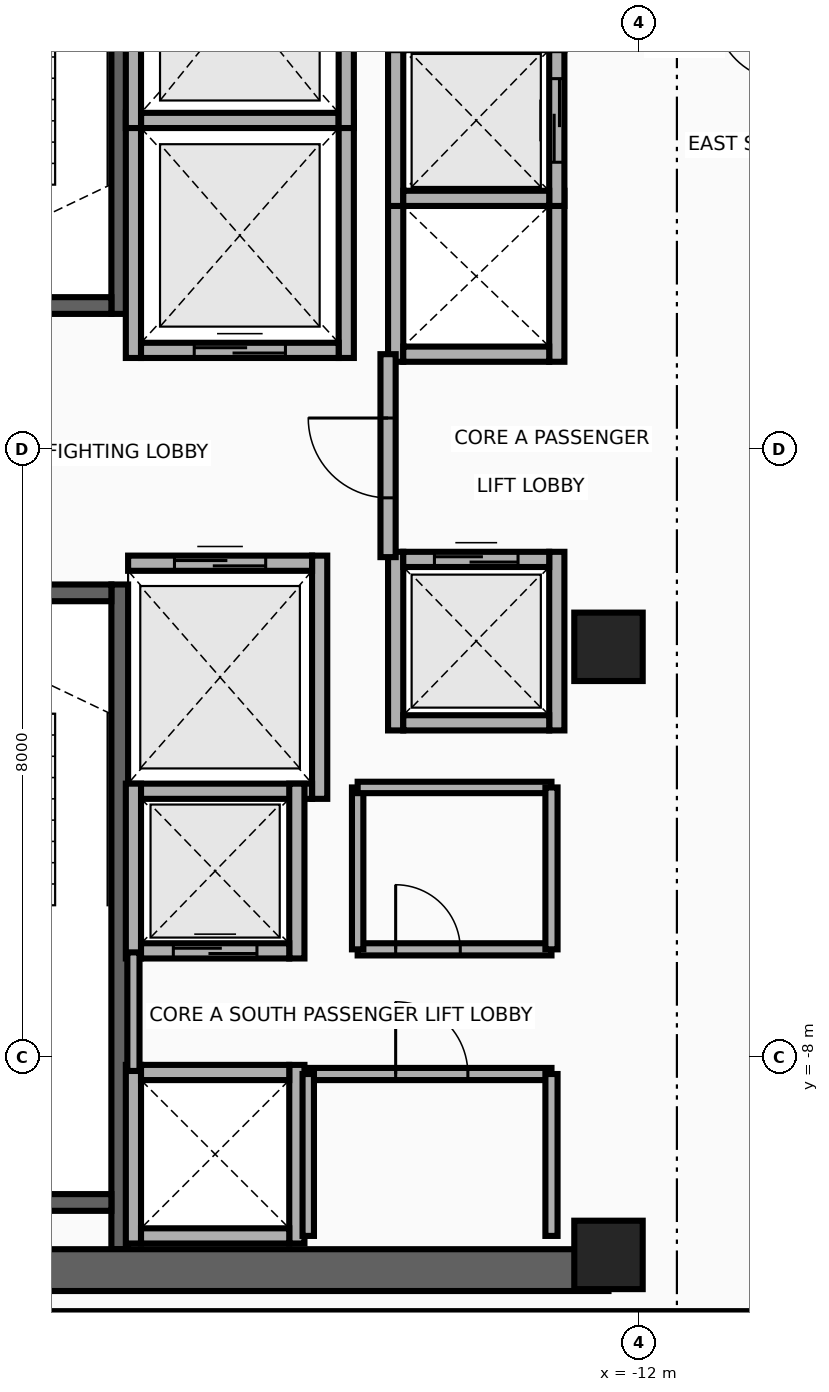
"""IFC4 building model, lengths in metres.
Left out: names, types, materials, properties, quantities, classifications, styles, units other than length and angle.
Written with IfcOpenShell. Run it as: python <this file> out.ifc"""

import sys

from ifc_helpers import new_model, si_unit, direction, frame, frame_2d, origin, origin_2d, place, context, subcontext, project, spatial, rectangle, extrude, source, transform, mapped, element, fill, save


model = new_model("IFC4")
c1 = context("Model", 3, precision=1e-05, world=origin(), true_north=direction((0.0, 1.0)))
c2 = subcontext(c1, "Body", "Model", "MODEL_VIEW")
j1 = project(units=[si_unit("LENGTHUNIT", "METRE"), si_unit("PLANEANGLEUNIT", "RADIAN")], contexts=[c1])
p1 = place(None, origin())
s1 = spatial("IfcSite", under=j1, at=p1, CompositionType="ELEMENT")
p2 = place(p1, origin())
s2 = spatial("IfcBuilding", under=s1, at=p2, CompositionType="ELEMENT")
p3 = place(p2, frame((0.0, 0.0, 205.5)))
s3 = spatial("IfcBuildingStorey", under=s2, at=p3, CompositionType="ELEMENT", Elevation=205.5)
p4 = place(p3, frame((-18.83, 1.78, 0.0), z_axis=(0.0, 0.0, 1.0), x_axis=(0.0, 1.0, 0.0)))
e1 = element("IfcWall", 1, at=p4, inside=s3, PredefinedType="SHEAR", context=c2, shape_type="SweptSolid", body=[
    extrude(rectangle(XDim=8.745, YDim=0.22, at=frame_2d((4.373, 0.0))), origin(), (0.0, 0.0, 1.0), 3.26),
])
p5 = place(p3, frame((-22.05, 1.89, 0.0), z_axis=(0.0, 0.0, 1.0), x_axis=(1.0, 0.0, 0.0)))
e2 = element("IfcWall", 2, at=p5, inside=s3, PredefinedType="SHEAR", context=c2, shape_type="SweptSolid", body=[
    extrude(rectangle(XDim=3.11, YDim=0.22, at=frame_2d((1.555, 0.0))), origin(), (0.0, 0.0, 1.0), 3.26),
])
p6 = place(p5, frame((1.0, 0.0, 0.0)))
e3 = element("IfcOpeningElement", 3, at=p6, cuts=e2, PredefinedType="OPENING", context=c2, shape_type="SweptSolid", body=[
    extrude(rectangle(XDim=1.1, YDim=2.15, at=frame_2d((0.55, 1.075))), frame((0.0, 0.125, 0.0), z_axis=(0.0, -1.0, 0.0), x_axis=(1.0, 0.0, 0.0)), (0.0, 0.0, 1.0), 0.25),
])
p7 = place(p3, frame((-18.83, -10.525, 0.0), z_axis=(0.0, 0.0, 1.0), x_axis=(0.0, 1.0, 0.0)))
e4 = element("IfcWall", 4, at=p7, inside=s3, PredefinedType="SHEAR", context=c2, shape_type="SweptSolid", body=[
    extrude(rectangle(XDim=8.745, YDim=0.22, at=frame_2d((4.373, 0.0))), origin(), (0.0, 0.0, 1.0), 3.26),
])
p8 = place(p3, frame((-22.05, -9.91, 0.0), z_axis=(0.0, 0.0, 1.0), x_axis=(1.0, 0.0, 0.0)))
e5 = element("IfcWall", 5, at=p8, inside=s3, PredefinedType="SHEAR", context=c2, shape_type="SweptSolid", body=[
    extrude(rectangle(XDim=3.11, YDim=0.22, at=frame_2d((1.555, 0.0))), origin(), (0.0, 0.0, 1.0), 3.26),
])
p9 = place(p3, frame((-22.05, -1.89, 0.0), z_axis=(0.0, 0.0, 1.0), x_axis=(1.0, 0.0, 0.0)))
e6 = element("IfcWall", 6, at=p9, inside=s3, PredefinedType="SHEAR", context=c2, shape_type="SweptSolid", body=[
    extrude(rectangle(XDim=3.11, YDim=0.22, at=frame_2d((1.555, 0.0))), origin(), (0.0, 0.0, 1.0), 3.26),
])
p10 = place(p9, frame((1.0, 0.0, 0.0)))
e7 = element("IfcOpeningElement", 7, at=p10, cuts=e6, PredefinedType="OPENING", context=c2, shape_type="SweptSolid", body=[
    extrude(rectangle(XDim=1.1, YDim=2.15, at=frame_2d((0.55, 1.075))), frame((0.0, 0.125, 0.0), z_axis=(0.0, -1.0, 0.0), x_axis=(1.0, 0.0, 0.0)), (0.0, 0.0, 1.0), 0.25),
])
p11 = place(p3, frame((-22.65, -10.8, 0.0), z_axis=(0.0, 0.0, 1.0), x_axis=(1.0, 0.0, 0.0)))
e8 = element("IfcWall", 8, at=p11, inside=s3, PredefinedType="SHEAR", context=c2, shape_type="SweptSolid", body=[
    extrude(rectangle(XDim=10.25, YDim=0.55, at=frame_2d((5.125, 0.0))), origin(), (0.0, 0.0, 1.0), 3.26),
])
m1 = source(origin(), c2, "Body", "SweptSolid", [
    extrude(rectangle(XDim=0.9, YDim=0.9, at=origin_2d()), origin(), (0.0, 0.0, 1.0), 3.5),
])
for number, where, z_axis, x_axis in (
    (9, (-12.4, -10.6, 0.0), (0.0, 0.0, 1.0), (1.0, 0.0, 0.0)),
    (10, (-12.4, -2.6, 0.0), (0.0, 0.0, 1.0), (1.0, 0.0, 0.0)),
):
    element("IfcColumn", number, at=place(p3, frame(where, z_axis=z_axis, x_axis=x_axis)), inside=s3, PredefinedType="COLUMN", context=c2, shape_type="MappedRepresentation", body=[
        mapped(m1, transform((0.0, 0.0, 0.0), x_axis=(1.0, 0.0, 0.0), y_axis=(0.0, 1.0, 0.0), z_axis=(0.0, 0.0, 1.0), scale=1.0)),
    ])
for number, where, z_axis, x_axis in (
    (11, (-18.65, 1.2, 0.0), (0.0, 0.0, 1.0), (0.0, 1.0, 0.0)),
    (12, (-15.85, 1.2, 0.0), (0.0, 0.0, 1.0), (0.0, 1.0, 0.0)),
):
    element("IfcWall", number, at=place(p3, frame(where, z_axis=z_axis, x_axis=x_axis)), inside=s3, PredefinedType="MOVABLE", context=c2, shape_type="SweptSolid", body=[
        extrude(rectangle(XDim=3.225, YDim=0.2, at=frame_2d((1.613, 0.0))), origin(), (0.0, 0.0, 1.0), 3.26),
    ])
p12 = place(p3, frame((-18.55, 1.3, 0.0), z_axis=(0.0, 0.0, 1.0), x_axis=(1.0, 0.0, 0.0)))
e13 = element("IfcWall", 13, at=p12, inside=s3, PredefinedType="MOVABLE", context=c2, shape_type="SweptSolid", body=[
    extrude(rectangle(XDim=2.6, YDim=0.2, at=frame_2d((1.3, 0.0))), origin(), (0.0, 0.0, 1.0), 3.26),
])
p13 = place(p12, frame((0.7, 0.0, 0.0)))
e14 = element("IfcOpeningElement", 14, at=p13, cuts=e13, PredefinedType="OPENING", context=c2, shape_type="SweptSolid", body=[
    extrude(rectangle(XDim=1.2, YDim=2.1, at=frame_2d((0.6, 1.05))), frame((0.0, 0.115, 0.0), z_axis=(0.0, -1.0, 0.0), x_axis=(1.0, 0.0, 0.0)), (0.0, 0.0, 1.0), 0.23),
])
p14 = place(p3, frame((-18.55, 4.325, 0.0), z_axis=(0.0, 0.0, 1.0), x_axis=(1.0, 0.0, 0.0)))
e15 = element("IfcWall", 15, at=p14, inside=s3, PredefinedType="MOVABLE", context=c2, shape_type="SweptSolid", body=[
    extrude(rectangle(XDim=2.6, YDim=0.2, at=frame_2d((1.3, 0.0))), origin(), (0.0, 0.0, 1.0), 3.26),
])
p15 = place(p3, frame((-16.2, -4.6, 0.0), z_axis=(0.0, 0.0, 1.0), x_axis=(0.0, 1.0, 0.0)))
e16 = element("IfcWall", 16, at=p15, inside=s3, PredefinedType="MOVABLE", context=c2, shape_type="SweptSolid", body=[
    extrude(rectangle(XDim=3.2, YDim=0.2, at=frame_2d((1.6, 0.0))), origin(), (0.0, 0.0, 1.0), 3.26),
])
p16 = place(p3, frame((-18.72, -4.5, 0.0), z_axis=(0.0, 0.0, 1.0), x_axis=(1.0, 0.0, 0.0)))
e17 = element("IfcWall", 17, at=p16, inside=s3, PredefinedType="MOVABLE", context=c2, shape_type="SweptSolid", body=[
    extrude(rectangle(XDim=2.42, YDim=0.2, at=frame_2d((1.21, 0.0))), origin(), (0.0, 0.0, 1.0), 3.26),
])
p17 = place(p3, frame((-18.72, -1.5, 0.0), z_axis=(0.0, 0.0, 1.0), x_axis=(1.0, 0.0, 0.0)))
e18 = element("IfcWall", 18, at=p17, inside=s3, PredefinedType="MOVABLE", context=c2, shape_type="SweptSolid", body=[
    extrude(rectangle(XDim=2.42, YDim=0.2, at=frame_2d((1.21, 0.0))), origin(), (0.0, 0.0, 1.0), 3.26),
])
p18 = place(p17, frame((0.61, 0.0, 0.0)))
e19 = element("IfcOpeningElement", 19, at=p18, cuts=e18, PredefinedType="OPENING", context=c2, shape_type="SweptSolid", body=[
    extrude(rectangle(XDim=1.2, YDim=2.1, at=frame_2d((0.6, 1.05))), frame((0.0, 0.115, 0.0), z_axis=(0.0, -1.0, 0.0), x_axis=(1.0, 0.0, 0.0)), (0.0, 0.0, 1.0), 0.23),
])
for number, where, z_axis, x_axis in (
    (20, (-18.65, 4.225, 0.0), (0.0, 0.0, 1.0), (0.0, 1.0, 0.0)),
    (21, (-15.85, 4.225, 0.0), (0.0, 0.0, 1.0), (0.0, 1.0, 0.0)),
):
    element("IfcWall", number, at=place(p3, frame(where, z_axis=z_axis, x_axis=x_axis)), inside=s3, PredefinedType="MOVABLE", context=c2, shape_type="SweptSolid", body=[
        extrude(rectangle(XDim=3.325, YDim=0.2, at=frame_2d((1.663, 0.0))), origin(), (0.0, 0.0, 1.0), 3.26),
    ])
for number, where, z_axis, x_axis in (
    (22, (-18.65, -10.45, 0.0), (0.0, 0.0, 1.0), (0.0, 1.0, 0.0)),
    (23, (-16.5, -10.45, 0.0), (0.0, 0.0, 1.0), (0.0, 1.0, 0.0)),
):
    element("IfcWall", number, at=place(p3, frame(where, z_axis=z_axis, x_axis=x_axis)), inside=s3, PredefinedType="MOVABLE", context=c2, shape_type="SweptSolid", body=[
        extrude(rectangle(XDim=2.35, YDim=0.2, at=frame_2d((1.175, 0.0))), origin(), (0.0, 0.0, 1.0), 2.544),
    ])
p19 = place(p3, frame((-18.55, -10.35, 0.0), z_axis=(0.0, 0.0, 1.0), x_axis=(1.0, 0.0, 0.0)))
e24 = element("IfcWall", 24, at=p19, inside=s3, PredefinedType="MOVABLE", context=c2, shape_type="SweptSolid", body=[
    extrude(rectangle(XDim=1.95, YDim=0.2, at=frame_2d((0.975, 0.0))), origin(), (0.0, 0.0, 1.0), 2.544),
])
p20 = place(p3, frame((-18.55, -8.2, 0.0), z_axis=(0.0, 0.0, 1.0), x_axis=(1.0, 0.0, 0.0)))
e25 = element("IfcWall", 25, at=p20, inside=s3, PredefinedType="MOVABLE", context=c2, shape_type="SweptSolid", body=[
    extrude(rectangle(XDim=1.95, YDim=0.2, at=frame_2d((0.975, 0.0))), origin(), (0.0, 0.0, 1.0), 3.26),
])
for number, where, z_axis, x_axis in (
    (26, (-15.2, 1.15, 0.0), (0.0, 0.0, 1.0), (0.0, 1.0, 0.0)),
    (27, (-13.08, 1.15, 0.0), (0.0, 0.0, 1.0), (0.0, 1.0, 0.0)),
):
    element("IfcWall", number, at=place(p3, frame(where, z_axis=z_axis, x_axis=x_axis)), inside=s3, PredefinedType="MOVABLE", context=c2, shape_type="SweptSolid", body=[
        extrude(rectangle(XDim=2.25, YDim=0.2, at=frame_2d((1.125, 0.0))), origin(), (0.0, 0.0, 1.0), 3.26),
    ])
p21 = place(p3, frame((-15.1, 1.25, 0.0), z_axis=(0.0, 0.0, 1.0), x_axis=(1.0, 0.0, 0.0)))
e28 = element("IfcWall", 28, at=p21, inside=s3, PredefinedType="MOVABLE", context=c2, shape_type="SweptSolid", body=[
    extrude(rectangle(XDim=1.92, YDim=0.2, at=frame_2d((0.96, 0.0))), origin(), (0.0, 0.0, 1.0), 3.26),
])
p22 = place(p3, frame((-15.2, 3.2, 0.0), z_axis=(0.0, 0.0, 1.0), x_axis=(0.0, 1.0, 0.0)))
e29 = element("IfcWall", 29, at=p22, inside=s3, PredefinedType="MOVABLE", context=c2, shape_type="SweptSolid", body=[
    extrude(rectangle(XDim=2.25, YDim=0.2, at=frame_2d((1.125, 0.0))), origin(), (0.0, 0.0, 1.0), 3.26),
])
p23 = place(p3, frame((-13.08, 3.2, 0.0), z_axis=(0.0, 0.0, 1.0), x_axis=(0.0, 1.0, 0.0)))
e30 = element("IfcWall", 30, at=p23, inside=s3, PredefinedType="MOVABLE", context=c2, shape_type="SweptSolid", body=[
    extrude(rectangle(XDim=2.25, YDim=0.2, at=frame_2d((1.125, 0.0))), origin(), (0.0, 0.0, 1.0), 3.26),
])
p24 = place(p23, frame((0.575, 0.0, 0.0)))
e31 = element("IfcOpeningElement", 31, at=p24, cuts=e30, PredefinedType="OPENING", context=c2, shape_type="SweptSolid", body=[
    extrude(rectangle(XDim=1.1, YDim=2.1, at=frame_2d((0.55, 1.05))), frame((0.0, 0.115, 0.0), z_axis=(0.0, -1.0, 0.0), x_axis=(1.0, 0.0, 0.0)), (0.0, 0.0, 1.0), 0.23),
])
p25 = place(p3, frame((-15.1, 3.3, 0.0), z_axis=(0.0, 0.0, 1.0), x_axis=(1.0, 0.0, 0.0)))
e32 = element("IfcWall", 32, at=p25, inside=s3, PredefinedType="MOVABLE", context=c2, shape_type="SweptSolid", body=[
    extrude(rectangle(XDim=1.92, YDim=0.2, at=frame_2d((0.96, 0.0))), origin(), (0.0, 0.0, 1.0), 3.26),
])
for number, where, z_axis, x_axis in (
    (33, (-18.65, -6.7, 0.0), (0.0, 0.0, 1.0), (0.0, 1.0, 0.0)),
    (34, (-16.5, -6.7, 0.0), (0.0, 0.0, 1.0), (0.0, 1.0, 0.0)),
):
    element("IfcWall", number, at=place(p3, frame(where, z_axis=z_axis, x_axis=x_axis)), inside=s3, PredefinedType="MOVABLE", context=c2, shape_type="SweptSolid", body=[
        extrude(rectangle(XDim=2.3, YDim=0.2, at=frame_2d((1.15, 0.0))), origin(), (0.0, 0.0, 1.0), 3.26),
    ])
p26 = place(p3, frame((-18.55, -6.6, 0.0), z_axis=(0.0, 0.0, 1.0), x_axis=(1.0, 0.0, 0.0)))
e35 = element("IfcWall", 35, at=p26, inside=s3, PredefinedType="MOVABLE", context=c2, shape_type="SweptSolid", body=[
    extrude(rectangle(XDim=1.95, YDim=0.2, at=frame_2d((0.975, 0.0))), origin(), (0.0, 0.0, 1.0), 3.26),
])
p27 = place(p26, frame((0.425, 0.0, 0.0)))
e36 = element("IfcOpeningElement", 36, at=p27, cuts=e35, PredefinedType="OPENING", context=c2, shape_type="SweptSolid", body=[
    extrude(rectangle(XDim=1.1, YDim=2.1, at=frame_2d((0.55, 1.05))), frame((0.0, 0.115, 0.0), z_axis=(0.0, -1.0, 0.0), x_axis=(1.0, 0.0, 0.0)), (0.0, 0.0, 1.0), 0.23),
])
for number, where, z_axis, x_axis in (
    (37, (-15.2, -3.7, 0.0), (0.0, 0.0, 1.0), (0.0, 1.0, 0.0)),
    (38, (-13.08, -3.7, 0.0), (0.0, 0.0, 1.0), (0.0, 1.0, 0.0)),
):
    element("IfcWall", number, at=place(p3, frame(where, z_axis=z_axis, x_axis=x_axis)), inside=s3, PredefinedType="MOVABLE", context=c2, shape_type="SweptSolid", body=[
        extrude(rectangle(XDim=2.35, YDim=0.2, at=frame_2d((1.175, 0.0))), origin(), (0.0, 0.0, 1.0), 3.26),
    ])
p28 = place(p3, frame((-15.1, -3.6, 0.0), z_axis=(0.0, 0.0, 1.0), x_axis=(1.0, 0.0, 0.0)))
e39 = element("IfcWall", 39, at=p28, inside=s3, PredefinedType="MOVABLE", context=c2, shape_type="SweptSolid", body=[
    extrude(rectangle(XDim=1.92, YDim=0.2, at=frame_2d((0.96, 0.0))), origin(), (0.0, 0.0, 1.0), 3.26),
])
p29 = place(p3, frame((-15.1, -1.45, 0.0), z_axis=(0.0, 0.0, 1.0), x_axis=(1.0, 0.0, 0.0)))
e40 = element("IfcWall", 40, at=p29, inside=s3, PredefinedType="MOVABLE", context=c2, shape_type="SweptSolid", body=[
    extrude(rectangle(XDim=1.92, YDim=0.2, at=frame_2d((0.96, 0.0))), origin(), (0.0, 0.0, 1.0), 3.26),
])
p30 = place(p29, frame((0.41, 0.0, 0.0)))
e41 = element("IfcOpeningElement", 41, at=p30, cuts=e40, PredefinedType="OPENING", context=c2, shape_type="SweptSolid", body=[
    extrude(rectangle(XDim=1.1, YDim=2.1, at=frame_2d((0.55, 1.05))), frame((0.0, 0.115, 0.0), z_axis=(0.0, -1.0, 0.0), x_axis=(1.0, 0.0, 0.0)), (0.0, 0.0, 1.0), 0.23),
])
p31 = place(p3, frame((-15.3, -1.42, 0.0), z_axis=(0.0, 0.0, 1.0), x_axis=(0.0, 1.0, 0.0)))
e42 = element("IfcWall", 42, at=p31, inside=s3, PredefinedType="PARTITIONING", context=c2, shape_type="SweptSolid", body=[
    extrude(rectangle(XDim=2.67, YDim=0.2, at=frame_2d((1.335, 0.0))), origin(), (0.0, 0.0, 1.0), 3.26),
])
p32 = place(p31, frame((0.78, 0.0, 0.0)))
e43 = element("IfcOpeningElement", 43, at=p32, cuts=e42, PredefinedType="OPENING", context=c2, shape_type="SweptSolid", body=[
    extrude(rectangle(XDim=1.05, YDim=2.15, at=frame_2d((0.525, 1.075))), frame((0.0, 0.115, 0.0), z_axis=(0.0, -1.0, 0.0), x_axis=(1.0, 0.0, 0.0)), (0.0, 0.0, 1.0), 0.23),
])
p33 = place(p3, frame((-18.65, -8.18, 0.0), z_axis=(0.0, 0.0, 1.0), x_axis=(0.0, 1.0, 0.0)))
e44 = element("IfcWall", 44, at=p33, inside=s3, PredefinedType="PARTITIONING", context=c2, shape_type="SweptSolid", body=[
    extrude(rectangle(XDim=1.56, YDim=0.16, at=frame_2d((0.78, 0.0))), origin(), (0.0, 0.0, 1.0), 3.26),
])
p34 = place(p3, frame((-16.35, -8.22, 0.0), z_axis=(0.0, 0.0, 1.0), x_axis=(1.0, 0.0, 0.0)))
e45 = element("IfcWall", 45, at=p34, inside=s3, PredefinedType="PARTITIONING", context=c2, shape_type="SweptSolid", body=[
    extrude(rectangle(XDim=3.2, YDim=0.16, at=frame_2d((1.6, 0.0))), origin(), (0.0, 0.0, 1.0), 3.26),
])
p35 = place(p34, frame((1.15, 0.0, 0.0)))
e46 = element("IfcOpeningElement", 46, at=p35, cuts=e45, PredefinedType="OPENING", context=c2, shape_type="SweptSolid", body=[
    extrude(rectangle(XDim=0.95, YDim=2.15, at=frame_2d((0.475, 1.075))), frame((0.0, 0.095, 0.0), z_axis=(0.0, -1.0, 0.0), x_axis=(1.0, 0.0, 0.0)), (0.0, 0.0, 1.0), 0.19),
])
p36 = place(p3, frame((-16.35, -10.35, 0.0), z_axis=(0.0, 0.0, 1.0), x_axis=(0.0, 1.0, 0.0)))
e47 = element("IfcWall", 47, at=p36, inside=s3, PredefinedType="PARTITIONING", context=c2, shape_type="SweptSolid", body=[
    extrude(rectangle(XDim=2.13, YDim=0.15, at=frame_2d((1.065, 0.0))), origin(), (0.0, 0.0, 1.0), 3.26),
])
p37 = place(p3, frame((-13.15, -10.35, 0.0), z_axis=(0.0, 0.0, 1.0), x_axis=(0.0, 1.0, 0.0)))
e48 = element("IfcWall", 48, at=p37, inside=s3, PredefinedType="PARTITIONING", context=c2, shape_type="SweptSolid", body=[
    extrude(rectangle(XDim=2.13, YDim=0.16, at=frame_2d((1.065, 0.0))), origin(), (0.0, 0.0, 1.0), 3.26),
])
p38 = place(p3, frame((-15.7, -6.58, 0.0), z_axis=(0.0, 0.0, 1.0), x_axis=(1.0, 0.0, 0.0)))
e49 = element("IfcWall", 49, at=p38, inside=s3, PredefinedType="PARTITIONING", context=c2, shape_type="SweptSolid", body=[
    extrude(rectangle(XDim=2.55, YDim=0.16, at=frame_2d((1.275, 0.0))), origin(), (0.0, 0.0, 1.0), 3.26),
])
p39 = place(p38, frame((0.5, 0.0, 0.0)))
e50 = element("IfcOpeningElement", 50, at=p39, cuts=e49, PredefinedType="OPENING", context=c2, shape_type="SweptSolid", body=[
    extrude(rectangle(XDim=0.85, YDim=2.05, at=frame_2d((0.425, 1.025))), frame((0.0, 0.095, 0.0), z_axis=(0.0, -1.0, 0.0), x_axis=(1.0, 0.0, 0.0)), (0.0, 0.0, 1.0), 0.19),
])
p40 = place(p3, frame((-15.7, -6.58, 0.0), z_axis=(0.0, 0.0, 1.0), x_axis=(0.0, 1.0, 0.0)))
e51 = element("IfcWall", 51, at=p40, inside=s3, PredefinedType="PARTITIONING", context=c2, shape_type="SweptSolid", body=[
    extrude(rectangle(XDim=2.13, YDim=0.15, at=frame_2d((1.065, 0.0))), origin(), (0.0, 0.0, 1.0), 3.26),
])
p41 = place(p3, frame((-15.7, -4.45, 0.0), z_axis=(0.0, 0.0, 1.0), x_axis=(1.0, 0.0, 0.0)))
e52 = element("IfcWall", 52, at=p41, inside=s3, PredefinedType="PARTITIONING", context=c2, shape_type="SweptSolid", body=[
    extrude(rectangle(XDim=2.55, YDim=0.15, at=frame_2d((1.275, 0.0))), origin(), (0.0, 0.0, 1.0), 3.26),
])
p42 = place(p3, frame((-13.15, -6.58, 0.0), z_axis=(0.0, 0.0, 1.0), x_axis=(0.0, 1.0, 0.0)))
e53 = element("IfcWall", 53, at=p42, inside=s3, PredefinedType="PARTITIONING", context=c2, shape_type="SweptSolid", body=[
    extrude(rectangle(XDim=2.13, YDim=0.16, at=frame_2d((1.065, 0.0))), origin(), (0.0, 0.0, 1.0), 3.26),
])
p43 = place(p3, frame((-23.45, -11.42, 0.0), z_axis=(0.0, 0.0, 1.0), x_axis=(1.0, 0.0, 0.0)))
e54 = element("IfcWall", 54, at=p43, inside=s3, PredefinedType="PARTITIONING", context=c2, shape_type="SweptSolid", body=[
    extrude(rectangle(XDim=13.84, YDim=0.16, at=frame_2d((6.92, 0.0))), origin(), (0.0, 0.0, 1.0), 2.634),
])
p44 = place(p13, origin())
e55 = element("IfcDoor", 55, at=p44, inside=s3, OperationType="DOUBLE_DOOR_SLIDING", PredefinedType="DOOR", context=c2, shape_type="SweptSolid", body=[
    extrude(rectangle(XDim=1.2, YDim=2.1, at=frame_2d((0.6, 1.05))), frame((0.0, 0.025, 0.0), z_axis=(0.0, -1.0, 0.0), x_axis=(1.0, 0.0, 0.0)), (0.0, 0.0, 1.0), 0.05),
])
fill(e14, e55)
p45 = place(p18, origin())
e56 = element("IfcDoor", 56, at=p45, inside=s3, OperationType="DOUBLE_DOOR_SLIDING", PredefinedType="DOOR", context=c2, shape_type="SweptSolid", body=[
    extrude(rectangle(XDim=1.2, YDim=2.1, at=frame_2d((0.6, 1.05))), frame((0.0, 0.025, 0.0), z_axis=(0.0, -1.0, 0.0), x_axis=(1.0, 0.0, 0.0)), (0.0, 0.0, 1.0), 0.05),
])
fill(e19, e56)
p46 = place(p24, origin())
e57 = element("IfcDoor", 57, at=p46, inside=s3, OperationType="DOUBLE_DOOR_SLIDING", PredefinedType="DOOR", context=c2, shape_type="SweptSolid", body=[
    extrude(rectangle(XDim=1.1, YDim=2.1, at=frame_2d((0.55, 1.05))), frame((0.0, 0.025, 0.0), z_axis=(0.0, -1.0, 0.0), x_axis=(1.0, 0.0, 0.0)), (0.0, 0.0, 1.0), 0.05),
])
fill(e31, e57)
p47 = place(p27, origin())
e58 = element("IfcDoor", 58, at=p47, inside=s3, OperationType="DOUBLE_DOOR_SLIDING", PredefinedType="DOOR", context=c2, shape_type="SweptSolid", body=[
    extrude(rectangle(XDim=1.1, YDim=2.1, at=frame_2d((0.55, 1.05))), frame((0.0, 0.025, 0.0), z_axis=(0.0, -1.0, 0.0), x_axis=(1.0, 0.0, 0.0)), (0.0, 0.0, 1.0), 0.05),
])
fill(e36, e58)
p48 = place(p30, origin())
e59 = element("IfcDoor", 59, at=p48, inside=s3, OperationType="DOUBLE_DOOR_SLIDING", PredefinedType="DOOR", context=c2, shape_type="SweptSolid", body=[
    extrude(rectangle(XDim=1.1, YDim=2.1, at=frame_2d((0.55, 1.05))), frame((0.0, 0.025, 0.0), z_axis=(0.0, -1.0, 0.0), x_axis=(1.0, 0.0, 0.0)), (0.0, 0.0, 1.0), 0.05),
])
fill(e41, e59)
p49 = place(p32, origin())
e60 = element("IfcDoor", 60, at=p49, inside=s3, OperationType="SINGLE_SWING_RIGHT", PredefinedType="DOOR", context=c2, shape_type="SweptSolid", body=[
    extrude(rectangle(XDim=1.05, YDim=2.15, at=frame_2d((0.525, 1.075))), frame((0.0, 0.025, 0.0), z_axis=(0.0, -1.0, 0.0), x_axis=(1.0, 0.0, 0.0)), (0.0, 0.0, 1.0), 0.05),
])
fill(e43, e60)
p50 = place(p35, origin())
e61 = element("IfcDoor", 61, at=p50, inside=s3, OperationType="SINGLE_SWING_LEFT", PredefinedType="DOOR", context=c2, shape_type="SweptSolid", body=[
    extrude(rectangle(XDim=0.95, YDim=2.15, at=frame_2d((0.475, 1.075))), frame((0.0, 0.025, 0.0), z_axis=(0.0, -1.0, 0.0), x_axis=(1.0, 0.0, 0.0)), (0.0, 0.0, 1.0), 0.05),
])
fill(e46, e61)
p51 = place(p39, origin())
e62 = element("IfcDoor", 62, at=p51, inside=s3, OperationType="SINGLE_SWING_RIGHT", PredefinedType="DOOR", context=c2, shape_type="SweptSolid", body=[
    extrude(rectangle(XDim=0.85, YDim=2.05, at=frame_2d((0.425, 1.025))), frame((0.0, 0.025, 0.0), z_axis=(0.0, -1.0, 0.0), x_axis=(1.0, 0.0, 0.0)), (0.0, 0.0, 1.0), 0.05),
])
fill(e50, e62)
save(model, sys.argv[1])
